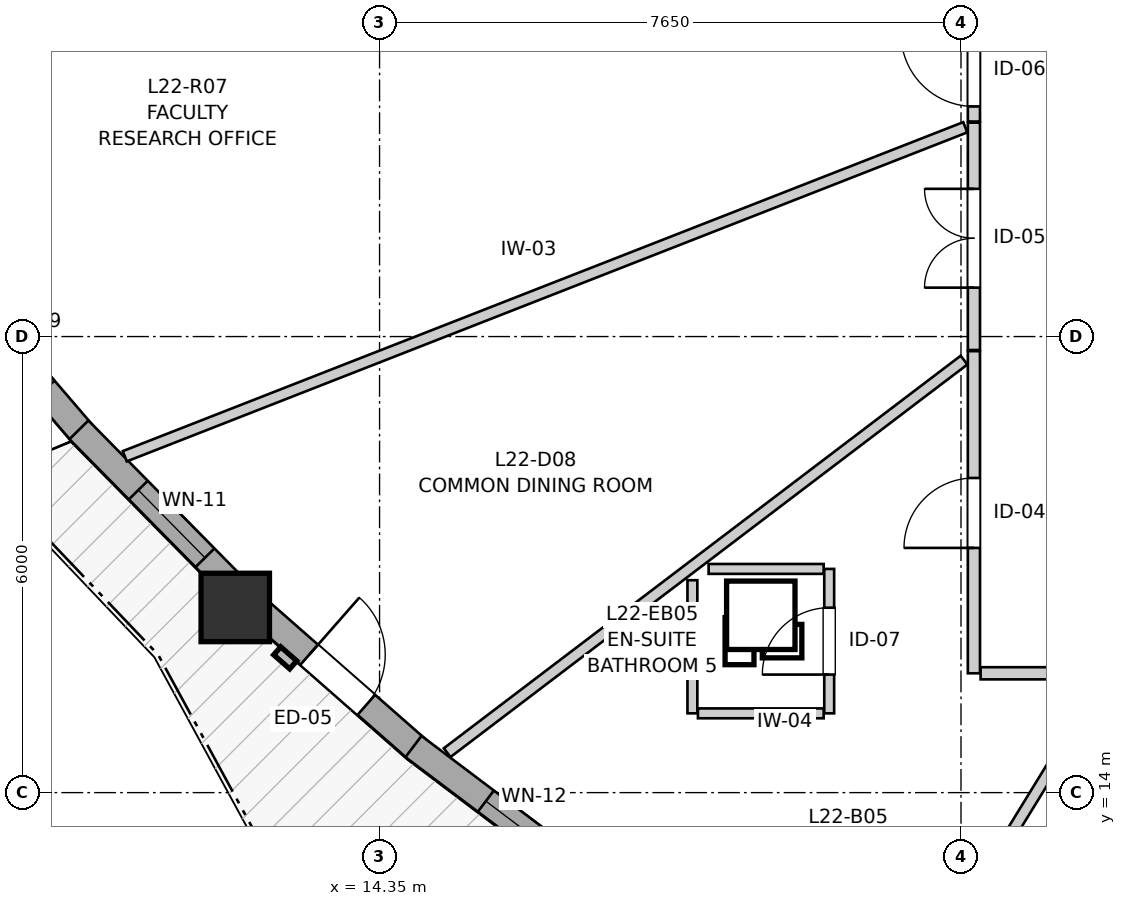
"""IFC4 building model, lengths in metres.
Left out: names, types, materials, properties, quantities, classifications, styles, units other than length and angle.
Written with IfcOpenShell. Run it as: python <this file> out.ifc"""

import sys

from ifc_helpers import new_model, si_unit, direction, frame, frame_2d, origin, origin_2d, place, context, subcontext, project, spatial, rectangle, extrude, source, transform, mapped, element, fill, save


model = new_model("IFC4")
c1 = context("Model", 3, precision=1e-05, world=origin(), true_north=direction((0.0, 1.0)))
c2 = subcontext(c1, "Body", "Model", "MODEL_VIEW")
j1 = project(units=[si_unit("LENGTHUNIT", "METRE"), si_unit("PLANEANGLEUNIT", "RADIAN")], contexts=[c1])
p1 = place(None, origin())
s1 = spatial("IfcSite", under=j1, at=p1, CompositionType="ELEMENT")
p2 = place(p1, origin())
s2 = spatial("IfcBuilding", under=s1, at=p2, CompositionType="ELEMENT")
p3 = place(p2, frame((0.0, 0.0, 76.8)))
s3 = spatial("IfcBuildingStorey", under=s2, at=p3, CompositionType="ELEMENT", Elevation=76.8)
m1 = source(origin(), c2, "Body", "SweptSolid", [
    extrude(rectangle(XDim=0.9, YDim=0.9, at=origin_2d()), origin(), (0.0, 0.0, 1.0), 2.935),
])
p4 = place(p3, frame((12.451, 16.436, 0.0), z_axis=(0.0, 0.0, 1.0), x_axis=(1.0, 0.0, 0.0)))
e1 = element("IfcColumn", 1, at=p4, inside=s3, PredefinedType="COLUMN", context=c2, shape_type="MappedRepresentation", body=[
    mapped(m1, transform((0.0, 0.0, 0.0), x_axis=(1.0, 0.0, 0.0), y_axis=(0.0, 1.0, 0.0), z_axis=(0.0, 0.0, 1.0), scale=1.0)),
])
p5 = place(p3, frame((8.402, 21.102, 0.0), z_axis=(0.0, 0.0, 1.0), x_axis=(0.650797748491, -0.759251138004, 0.0)))
e2 = element("IfcWall", 2, at=p5, inside=s3, PredefinedType="SOLIDWALL", context=c2, shape_type="SweptSolid", body=[
    extrude(rectangle(XDim=3.154, YDim=0.35, at=frame_2d((1.577, 0.0))), origin(), (0.0, 0.0, 1.0), 2.465),
])
p6 = place(p5, frame((0.767, 0.0, 0.82)))
e3 = element("IfcOpeningElement", 3, at=p6, cuts=e2, PredefinedType="OPENING", context=c2, shape_type="SweptSolid", body=[
    extrude(rectangle(XDim=1.6, YDim=1.35, at=frame_2d((0.8, 0.675))), frame((0.0, 0.185, 0.0), z_axis=(0.0, -1.0, 0.0), x_axis=(1.0, 0.0, 0.0)), (0.0, 0.0, 1.0), 0.37),
])
p7 = place(p3, frame((10.394, 18.773, 0.0), z_axis=(0.0, 0.0, 1.0), x_axis=(0.701965316192, -0.712211130819, 0.0)))
e4 = element("IfcWall", 4, at=p7, inside=s3, PredefinedType="SOLIDWALL", context=c2, shape_type="SweptSolid", body=[
    extrude(rectangle(XDim=2.883, YDim=0.35, at=frame_2d((1.442, 0.0))), origin(), (0.0, 0.0, 1.0), 2.465),
])
p8 = place(p7, frame((1.113, 0.0, 0.82)))
e5 = element("IfcOpeningElement", 5, at=p8, cuts=e4, PredefinedType="OPENING", context=c2, shape_type="SweptSolid", body=[
    extrude(rectangle(XDim=1.25, YDim=1.35, at=frame_2d((0.625, 0.675))), frame((0.0, 0.185, 0.0), z_axis=(0.0, -1.0, 0.0), x_axis=(1.0, 0.0, 0.0)), (0.0, 0.0, 1.0), 0.37),
])
p9 = place(p3, frame((12.736, 16.419, 0.0), z_axis=(0.0, 0.0, 1.0), x_axis=(0.751507962483, -0.659724019818, 0.0)))
e6 = element("IfcWall", 6, at=p9, inside=s3, PredefinedType="SOLIDWALL", context=c2, shape_type="SweptSolid", body=[
    extrude(rectangle(XDim=2.833, YDim=0.35, at=frame_2d((1.417, 0.0))), origin(), (0.0, 0.0, 1.0), 2.465),
])
p10 = place(p9, frame((0.917, 0.0, 0.0)))
e7 = element("IfcOpeningElement", 7, at=p10, cuts=e6, PredefinedType="OPENING", context=c2, shape_type="SweptSolid", body=[
    extrude(rectangle(XDim=1.0, YDim=2.1, at=frame_2d((0.5, 1.05))), frame((0.0, 0.185, 0.0), z_axis=(0.0, -1.0, 0.0), x_axis=(1.0, 0.0, 0.0)), (0.0, 0.0, 1.0), 0.37),
])
p11 = place(p3, frame((14.796, 14.606, 0.0), z_axis=(0.0, 0.0, 1.0), x_axis=(0.79839776153, -0.602130396496, 0.0)))
e8 = element("IfcWall", 8, at=p11, inside=s3, PredefinedType="SOLIDWALL", context=c2, shape_type="SweptSolid", body=[
    extrude(rectangle(XDim=3.004, YDim=0.35, at=frame_2d((1.502, 0.0))), origin(), (0.0, 0.0, 1.0), 2.465),
])
p12 = place(p11, frame((1.193, 0.0, 0.82)))
e9 = element("IfcOpeningElement", 9, at=p12, cuts=e8, PredefinedType="OPENING", context=c2, shape_type="SweptSolid", body=[
    extrude(rectangle(XDim=0.95, YDim=1.35, at=frame_2d((0.475, 0.675))), frame((0.0, 0.185, 0.0), z_axis=(0.0, -1.0, 0.0), x_axis=(1.0, 0.0, 0.0)), (0.0, 0.0, 1.0), 0.37),
])
p13 = place(p3, frame((22.17, 15.57, 0.0), z_axis=(0.0, 0.0, 1.0), x_axis=(0.0, 1.0, 0.0)))
e10 = element("IfcWall", 10, at=p13, inside=s3, PredefinedType="PARTITIONING", context=c2, shape_type="SweptSolid", body=[
    extrude(rectangle(XDim=4.238, YDim=0.16, at=frame_2d((2.119, 0.0))), origin(), (0.0, 0.0, 1.0), 2.935),
])
p14 = place(p13, frame((1.649, 0.0, 0.0)))
e11 = element("IfcOpeningElement", 11, at=p14, cuts=e10, PredefinedType="OPENING", context=c2, shape_type="SweptSolid", body=[
    extrude(rectangle(XDim=0.92, YDim=2.1, at=frame_2d((0.46, 1.05))), frame((0.0, 0.09, 0.0), z_axis=(0.0, -1.0, 0.0), x_axis=(1.0, 0.0, 0.0)), (0.0, 0.0, 1.0), 0.18),
])
p15 = place(p3, frame((22.17, 19.823, 0.0), z_axis=(0.0, 0.0, 1.0), x_axis=(0.0, 1.0, 0.0)))
e12 = element("IfcWall", 12, at=p15, inside=s3, PredefinedType="PARTITIONING", context=c2, shape_type="SweptSolid", body=[
    extrude(rectangle(XDim=2.991, YDim=0.16, at=frame_2d((1.496, 0.0))), origin(), (0.0, 0.0, 1.0), 2.935),
])
p16 = place(p15, frame((0.821, 0.0, 0.0)))
e13 = element("IfcOpeningElement", 13, at=p16, cuts=e12, PredefinedType="OPENING", context=c2, shape_type="SweptSolid", body=[
    extrude(rectangle(XDim=1.3, YDim=2.1, at=frame_2d((0.65, 1.05))), frame((0.0, 0.09, 0.0), z_axis=(0.0, -1.0, 0.0), x_axis=(1.0, 0.0, 0.0)), (0.0, 0.0, 1.0), 0.18),
])
p17 = place(p3, frame((20.266, 15.043, 0.0), z_axis=(0.0, 0.0, 1.0), x_axis=(0.0, 1.0, 0.0)))
e14 = element("IfcWall", 14, at=p17, inside=s3, PredefinedType="PARTITIONING", context=c2, shape_type="SweptSolid", body=[
    extrude(rectangle(XDim=1.9, YDim=0.13, at=frame_2d((0.95, 0.0))), origin(), (0.0, 0.0, 1.0), 2.935),
])
p18 = place(p17, frame((0.51, 0.0, 0.0)))
e15 = element("IfcOpeningElement", 15, at=p18, cuts=e14, PredefinedType="OPENING", context=c2, shape_type="SweptSolid", body=[
    extrude(rectangle(XDim=0.88, YDim=2.05, at=frame_2d((0.44, 1.025))), frame((0.0, 0.075, 0.0), z_axis=(0.0, -1.0, 0.0), x_axis=(1.0, 0.0, 0.0)), (0.0, 0.0, 1.0), 0.15),
])
p19 = place(p3, frame((22.17, 22.829, 0.0), z_axis=(0.0, 0.0, 1.0), x_axis=(0.0, 1.0, 0.0)))
e16 = element("IfcWall", 16, at=p19, inside=s3, PredefinedType="PARTITIONING", context=c2, shape_type="SweptSolid", body=[
    extrude(rectangle(XDim=1.321, YDim=0.16, at=frame_2d((0.66, 0.0))), origin(), (0.0, 0.0, 1.0), 2.935),
])
p20 = place(p19, frame((0.198, 0.0, 0.0)))
e17 = element("IfcOpeningElement", 17, at=p20, cuts=e16, PredefinedType="OPENING", context=c2, shape_type="SweptSolid", body=[
    extrude(rectangle(XDim=0.96, YDim=2.1, at=frame_2d((0.48, 1.05))), frame((0.0, 0.09, 0.0), z_axis=(0.0, -1.0, 0.0), x_axis=(1.0, 0.0, 0.0)), (0.0, 0.0, 1.0), 0.18),
])
p21 = place(p3, frame((10.998, 18.425, 0.0), z_axis=(0.0, 0.0, 1.0), x_axis=(0.931213049878, 0.364475315676, 0.0)))
e18 = element("IfcWall", 18, at=p21, inside=s3, PredefinedType="PARTITIONING", context=c2, shape_type="SweptSolid", body=[
    extrude(rectangle(XDim=11.875, YDim=0.145, at=frame_2d((5.938, 0.0))), origin(), (0.0, 0.0, 1.0), 2.935),
])
p22 = place(p3, frame((15.239, 14.526, 0.0), z_axis=(0.0, 0.0, 1.0), x_axis=(0.796393529077, 0.604778758592, 0.0)))
e19 = element("IfcWall", 19, at=p22, inside=s3, PredefinedType="PARTITIONING", context=c2, shape_type="SweptSolid", body=[
    extrude(rectangle(XDim=8.539, YDim=0.145, at=frame_2d((4.27, 0.0))), origin(), (0.0, 0.0, 1.0), 2.935),
])
p23 = place(p3, frame((20.973, 10.715, 0.0), z_axis=(0.0, 0.0, 1.0), x_axis=(0.522906546436, 0.852390018533, 0.0)))
e20 = element("IfcWall", 20, at=p23, inside=s3, PredefinedType="PARTITIONING", context=c2, shape_type="SweptSolid", body=[
    extrude(rectangle(XDim=5.55, YDim=0.145, at=frame_2d((2.775, 0.0))), origin(), (0.0, 0.0, 1.0), 2.935),
])
p24 = place(p3, frame((18.466, 15.043, 0.0), z_axis=(0.0, 0.0, 1.0), x_axis=(0.0, 1.0, 0.0)))
e21 = element("IfcWall", 21, at=p24, inside=s3, PredefinedType="PARTITIONING", context=c2, shape_type="SweptSolid", body=[
    extrude(rectangle(XDim=1.752, YDim=0.13, at=frame_2d((0.876, 0.0))), origin(), (0.0, 0.0, 1.0), 2.935),
])
p25 = place(p3, frame((18.679, 16.943, 0.0), z_axis=(0.0, 0.0, 1.0), x_axis=(1.0, 0.0, 0.0)))
e22 = element("IfcWall", 22, at=p25, inside=s3, PredefinedType="PARTITIONING", context=c2, shape_type="SweptSolid", body=[
    extrude(rectangle(XDim=1.514, YDim=0.13, at=frame_2d((0.757, 0.0))), origin(), (0.0, 0.0, 1.0), 2.935),
])
p26 = place(p3, frame((18.539, 15.043, 0.0), z_axis=(0.0, 0.0, 1.0), x_axis=(1.0, 0.0, 0.0)))
e23 = element("IfcWall", 23, at=p26, inside=s3, PredefinedType="PARTITIONING", context=c2, shape_type="SweptSolid", body=[
    extrude(rectangle(XDim=1.654, YDim=0.13, at=frame_2d((0.827, 0.0))), origin(), (0.0, 0.0, 1.0), 2.935),
])
p27 = place(p3, frame((22.258, 15.57, 0.0), z_axis=(0.0, 0.0, 1.0), x_axis=(1.0, 0.0, 0.0)))
e24 = element("IfcWall", 24, at=p27, inside=s3, PredefinedType="PARTITIONING", context=c2, shape_type="SweptSolid", body=[
    extrude(rectangle(XDim=1.52, YDim=0.16, at=frame_2d((0.76, 0.0))), origin(), (0.0, 0.0, 1.0), 2.935),
])
m2 = source(origin(), c2, "Body", "SweptSolid", [
    extrude(rectangle(XDim=1.25, YDim=1.35, at=frame_2d((0.625, 0.675))), frame((0.0, 0.03, 0.0), z_axis=(0.0, -1.0, 0.0), x_axis=(1.0, 0.0, 0.0)), (0.0, 0.0, 1.0), 0.06),
])
p28 = place(p8, origin())
e25 = element("IfcWindow", 25, at=p28, inside=s3, PartitioningType="SINGLE_PANEL", PredefinedType="WINDOW", context=c2, shape_type="MappedRepresentation", body=[
    mapped(m2, transform((0.0, 0.0, 0.0), x_axis=(1.0, 0.0, 0.0), y_axis=(0.0, 1.0, 0.0), z_axis=(0.0, 0.0, 1.0), scale=1.0)),
])
fill(e5, e25)
m3 = source(origin(), c2, "Body", "SweptSolid", [
    extrude(rectangle(XDim=0.95, YDim=1.35, at=frame_2d((0.475, 0.675))), frame((0.0, 0.03, 0.0), z_axis=(0.0, -1.0, 0.0), x_axis=(1.0, 0.0, 0.0)), (0.0, 0.0, 1.0), 0.06),
])
p29 = place(p12, origin())
e26 = element("IfcWindow", 26, at=p29, inside=s3, PartitioningType="SINGLE_PANEL", PredefinedType="WINDOW", context=c2, shape_type="MappedRepresentation", body=[
    mapped(m3, transform((0.0, 0.0, 0.0), x_axis=(1.0, 0.0, 0.0), y_axis=(0.0, 1.0, 0.0), z_axis=(0.0, 0.0, 1.0), scale=1.0)),
])
fill(e9, e26)
m4 = source(origin(), c2, "Body", "SweptSolid", [
    extrude(rectangle(XDim=1.0, YDim=2.1, at=frame_2d((0.5, 1.05))), frame((0.0, 0.025, 0.0), z_axis=(0.0, -1.0, 0.0), x_axis=(1.0, 0.0, 0.0)), (0.0, 0.0, 1.0), 0.05),
])
p30 = place(p10, origin())
e27 = element("IfcDoor", 27, at=p30, inside=s3, OperationType="SINGLE_SWING_LEFT", PredefinedType="DOOR", context=c2, shape_type="MappedRepresentation", body=[
    mapped(m4, transform((0.0, 0.0, 0.0), x_axis=(1.0, 0.0, 0.0), y_axis=(0.0, 1.0, 0.0), z_axis=(0.0, 0.0, 1.0), scale=1.0)),
])
fill(e7, e27)
m5 = source(origin(), c2, "Body", "SweptSolid", [
    extrude(rectangle(XDim=0.92, YDim=2.1, at=frame_2d((0.46, 1.05))), frame((0.0, 0.025, 0.0), z_axis=(0.0, -1.0, 0.0), x_axis=(1.0, 0.0, 0.0)), (0.0, 0.0, 1.0), 0.05),
])
p31 = place(p14, origin())
e28 = element("IfcDoor", 28, at=p31, inside=s3, OperationType="SINGLE_SWING_LEFT", PredefinedType="DOOR", context=c2, shape_type="MappedRepresentation", body=[
    mapped(m5, transform((0.0, 0.0, 0.0), x_axis=(1.0, 0.0, 0.0), y_axis=(0.0, 1.0, 0.0), z_axis=(0.0, 0.0, 1.0), scale=1.0)),
])
fill(e11, e28)
m6 = source(origin(), c2, "Body", "SweptSolid", [
    extrude(rectangle(XDim=1.3, YDim=2.1, at=frame_2d((0.65, 1.05))), frame((0.0, 0.025, 0.0), z_axis=(0.0, -1.0, 0.0), x_axis=(1.0, 0.0, 0.0)), (0.0, 0.0, 1.0), 0.05),
])
p32 = place(p16, origin())
e29 = element("IfcDoor", 29, at=p32, inside=s3, OperationType="DOUBLE_DOOR_SINGLE_SWING", PredefinedType="DOOR", context=c2, shape_type="MappedRepresentation", body=[
    mapped(m6, transform((0.0, 0.0, 0.0), x_axis=(1.0, 0.0, 0.0), y_axis=(0.0, 1.0, 0.0), z_axis=(0.0, 0.0, 1.0), scale=1.0)),
])
fill(e13, e29)
m7 = source(origin(), c2, "Body", "SweptSolid", [
    extrude(rectangle(XDim=0.88, YDim=2.05, at=frame_2d((0.44, 1.025))), frame((0.0, 0.025, 0.0), z_axis=(0.0, -1.0, 0.0), x_axis=(1.0, 0.0, 0.0)), (0.0, 0.0, 1.0), 0.05),
])
p33 = place(p18, origin())
e30 = element("IfcDoor", 30, at=p33, inside=s3, OperationType="SINGLE_SWING_LEFT", PredefinedType="DOOR", context=c2, shape_type="MappedRepresentation", body=[
    mapped(m7, transform((0.0, 0.0, 0.0), x_axis=(1.0, 0.0, 0.0), y_axis=(0.0, 1.0, 0.0), z_axis=(0.0, 0.0, 1.0), scale=1.0)),
])
fill(e15, e30)
m8 = source(origin(), c2, "Body", "SweptSolid", [
    extrude(rectangle(XDim=0.96, YDim=2.1, at=frame_2d((0.48, 1.05))), frame((0.0, 0.025, 0.0), z_axis=(0.0, -1.0, 0.0), x_axis=(1.0, 0.0, 0.0)), (0.0, 0.0, 1.0), 0.05),
])
p34 = place(p20, origin())
e31 = element("IfcDoor", 31, at=p34, inside=s3, OperationType="SINGLE_SWING_RIGHT", PredefinedType="DOOR", context=c2, shape_type="MappedRepresentation", body=[
    mapped(m8, transform((0.0, 0.0, 0.0), x_axis=(1.0, 0.0, 0.0), y_axis=(0.0, 1.0, 0.0), z_axis=(0.0, 0.0, 1.0), scale=1.0)),
])
fill(e17, e31)
save(model, sys.argv[1])
